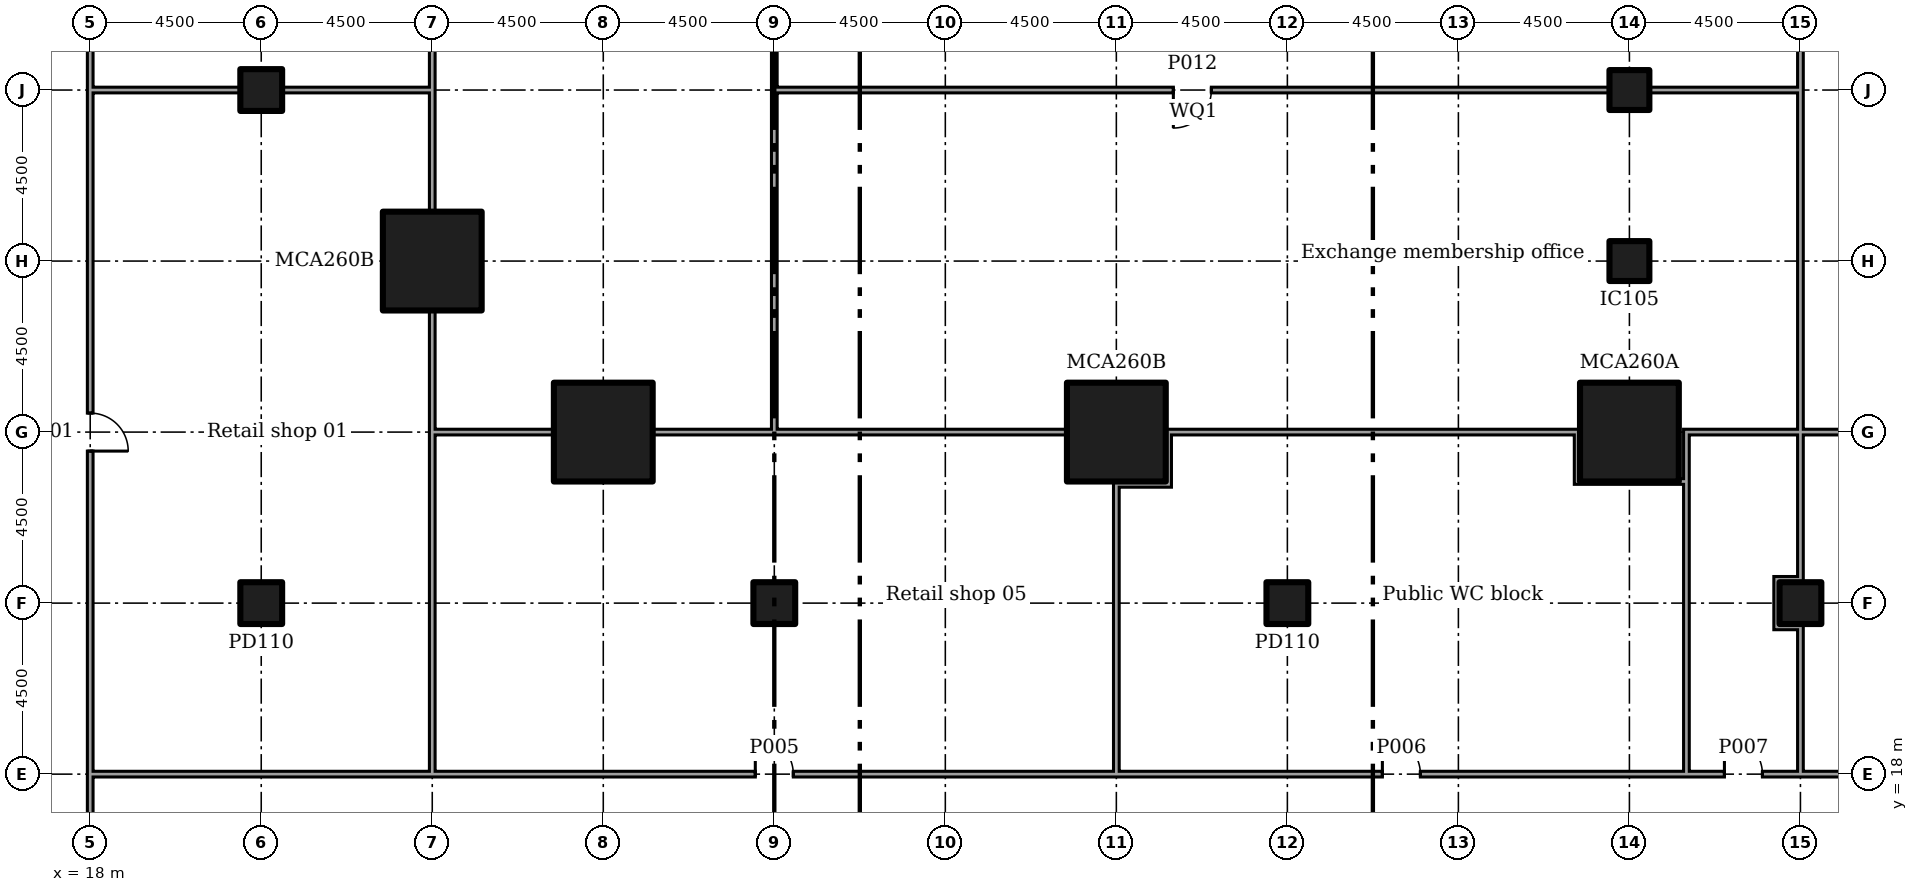
"""IFC4 building model, lengths in metres.
Left out: names, types, materials, properties, quantities, classifications, styles, units other than length and angle.
Written with IfcOpenShell. Run it as: python <this file> out.ifc"""

import sys

from ifc_helpers import new_model, si_unit, direction, frame, frame_2d, origin, origin_2d, place, context, subcontext, project, spatial, rectangle, extrude, element, fill, save


model = new_model("IFC4")
c1 = context("Model", 3, precision=1e-05, world=origin(), true_north=direction((0.0, 1.0)))
c2 = subcontext(c1, "Body", "Model", "MODEL_VIEW")
j1 = project(units=[si_unit("LENGTHUNIT", "METRE"), si_unit("PLANEANGLEUNIT", "RADIAN")], contexts=[c1])
p1 = place(None, origin())
s1 = spatial("IfcSite", under=j1, at=p1, CompositionType="ELEMENT")
p2 = place(p1, origin())
s2 = spatial("IfcBuilding", under=s1, at=p2, CompositionType="ELEMENT")
p3 = place(p2, frame((0.0, 0.0, 6.0)))
s3 = spatial("IfcBuildingStorey", under=s2, at=p3, CompositionType="ELEMENT", Elevation=6.0)
for number, where in (
    (1, (27.0, 31.5, 0.0)),
    (2, (31.5, 27.0, 0.0)),
    (3, (45.0, 27.0, 0.0)),
    (4, (58.5, 27.0, 0.0)),
):
    element("IfcColumn", number, at=place(p3, frame(where)), inside=s3, PredefinedType="COLUMN", context=c2, shape_type="SweptSolid", body=[
        extrude(rectangle(XDim=2.6, YDim=2.6, at=origin_2d()), origin(), (0.0, 0.0, 1.0), 5.5),
    ])
for number, where in (
    (5, (58.5, 31.5, 0.0)),
    (6, (58.5, 36.0, 0.0)),
):
    element("IfcColumn", number, at=place(p3, frame(where)), inside=s3, PredefinedType="COLUMN", context=c2, shape_type="SweptSolid", body=[
        extrude(rectangle(XDim=1.05, YDim=1.05, at=origin_2d()), origin(), (0.0, 0.0, 1.0), 5.5),
    ])
for number, where in (
    (7, (22.5, 22.5, 0.0)),
    (8, (22.5, 36.0, 0.0)),
    (9, (36.0, 22.5, 0.0)),
    (10, (49.5, 22.5, 0.0)),
    (11, (63.0, 22.5, 0.0)),
):
    element("IfcColumn", number, at=place(p3, frame(where)), inside=s3, PredefinedType="COLUMN", context=c2, shape_type="SweptSolid", body=[
        extrude(rectangle(XDim=1.1, YDim=1.1, at=origin_2d()), origin(), (0.0, 0.0, 1.0), 5.5),
    ])
p4 = place(p3, frame((18.0, 9.3, 0.0), z_axis=(0.0, 0.0, 1.0), x_axis=(0.0, 1.0, 0.0)))
e12 = element("IfcWall", 12, at=p4, inside=s3, PredefinedType="PARTITIONING", context=c2, shape_type="SweptSolid", body=[
    extrude(rectangle(XDim=8.775, YDim=0.15, at=frame_2d((4.387, 0.0))), origin(), (0.0, 0.0, 1.0), 5.05),
])
p5 = place(p4, frame((3.45, 0.0, 0.0)))
e13 = element("IfcOpeningElement", 13, at=p5, cuts=e12, PredefinedType="OPENING", context=c2, shape_type="SweptSolid", body=[
    extrude(rectangle(XDim=1.8, YDim=2.1, at=frame_2d((0.9, 1.05))), frame((0.0, 0.085, 0.0), z_axis=(0.0, -1.0, 0.0), x_axis=(1.0, 0.0, 0.0)), (0.0, 0.0, 1.0), 0.17),
])
p6 = place(p3, frame((18.0, 18.0, 0.0), z_axis=(0.0, 0.0, 1.0), x_axis=(0.0, 1.0, 0.0)))
e14 = element("IfcWall", 14, at=p6, inside=s3, PredefinedType="PARTITIONING", context=c2, shape_type="SweptSolid", body=[
    extrude(rectangle(XDim=18.075, YDim=0.15, at=frame_2d((9.038, 0.0))), origin(), (0.0, 0.0, 1.0), 5.05),
])
p7 = place(p6, frame((8.5, 0.0, 0.0)))
e15 = element("IfcOpeningElement", 15, at=p7, cuts=e14, PredefinedType="OPENING", context=c2, shape_type="SweptSolid", body=[
    extrude(rectangle(XDim=1.0, YDim=2.1, at=frame_2d((0.5, 1.05))), frame((0.0, 0.085, 0.0), z_axis=(0.0, -1.0, 0.0), x_axis=(1.0, 0.0, 0.0)), (0.0, 0.0, 1.0), 0.17),
])
p8 = place(p3, frame((18.0, 36.0, 0.0), z_axis=(0.0, 0.0, 1.0), x_axis=(0.0, 1.0, 0.0)))
e16 = element("IfcWall", 16, at=p8, inside=s3, PredefinedType="PARTITIONING", context=c2, shape_type="SweptSolid", body=[
    extrude(rectangle(XDim=18.075, YDim=0.15, at=frame_2d((9.038, 0.0))), origin(), (0.0, 0.0, 1.0), 5.05),
])
p9 = place(p8, frame((8.5, 0.0, 0.0)))
e17 = element("IfcOpeningElement", 17, at=p9, cuts=e16, PredefinedType="OPENING", context=c2, shape_type="SweptSolid", body=[
    extrude(rectangle(XDim=1.0, YDim=2.1, at=frame_2d((0.5, 1.05))), frame((0.0, 0.085, 0.0), z_axis=(0.0, -1.0, 0.0), x_axis=(1.0, 0.0, 0.0)), (0.0, 0.0, 1.0), 0.17),
])
p10 = place(p3, frame((18.075, 18.0, 0.0)))
e18 = element("IfcWall", 18, at=p10, inside=s3, PredefinedType="PARTITIONING", context=c2, shape_type="SweptSolid", body=[
    extrude(rectangle(XDim=9.0, YDim=0.15, at=frame_2d((4.5, 0.0))), origin(), (0.0, 0.0, 1.0), 5.05),
])
p11 = place(p3, frame((27.0, 18.0, 0.0)))
e19 = element("IfcWall", 19, at=p11, inside=s3, PredefinedType="PARTITIONING", context=c2, shape_type="SweptSolid", body=[
    extrude(rectangle(XDim=18.075, YDim=0.15, at=frame_2d((9.038, 0.0))), origin(), (0.0, 0.0, 1.0), 5.05),
])
p12 = place(p11, frame((8.5, 0.0, 0.0)))
e20 = element("IfcOpeningElement", 20, at=p12, cuts=e19, PredefinedType="OPENING", context=c2, shape_type="SweptSolid", body=[
    extrude(rectangle(XDim=1.0, YDim=2.1, at=frame_2d((0.5, 1.05))), frame((0.0, 0.085, 0.0), z_axis=(0.0, -1.0, 0.0), x_axis=(1.0, 0.0, 0.0)), (0.0, 0.0, 1.0), 0.17),
])
p13 = place(p3, frame((45.0, 18.0, 0.0)))
e21 = element("IfcWall", 21, at=p13, inside=s3, PredefinedType="PARTITIONING", context=c2, shape_type="SweptSolid", body=[
    extrude(rectangle(XDim=15.075, YDim=0.15, at=frame_2d((7.538, 0.0))), origin(), (0.0, 0.0, 1.0), 5.05),
])
p14 = place(p13, frame((7.0, 0.0, 0.0)))
e22 = element("IfcOpeningElement", 22, at=p14, cuts=e21, PredefinedType="OPENING", context=c2, shape_type="SweptSolid", body=[
    extrude(rectangle(XDim=1.0, YDim=2.1, at=frame_2d((0.5, 1.05))), frame((0.0, 0.085, 0.0), z_axis=(0.0, -1.0, 0.0), x_axis=(1.0, 0.0, 0.0)), (0.0, 0.0, 1.0), 0.17),
])
p15 = place(p3, frame((60.0, 18.0, 0.0)))
e23 = element("IfcWall", 23, at=p15, inside=s3, PredefinedType="PARTITIONING", context=c2, shape_type="SweptSolid", body=[
    extrude(rectangle(XDim=3.075, YDim=0.15, at=frame_2d((1.538, 0.0))), origin(), (0.0, 0.0, 1.0), 5.05),
])
p16 = place(p15, frame((1.0, 0.0, 0.0)))
e24 = element("IfcOpeningElement", 24, at=p16, cuts=e23, PredefinedType="OPENING", context=c2, shape_type="SweptSolid", body=[
    extrude(rectangle(XDim=1.0, YDim=2.1, at=frame_2d((0.5, 1.05))), frame((0.0, 0.085, 0.0), z_axis=(0.0, -1.0, 0.0), x_axis=(1.0, 0.0, 0.0)), (0.0, 0.0, 1.0), 0.17),
])
p17 = place(p3, frame((63.0, 18.0, 0.0)))
e25 = element("IfcWall", 25, at=p17, inside=s3, PredefinedType="PARTITIONING", context=c2, shape_type="SweptSolid", body=[
    extrude(rectangle(XDim=8.925, YDim=0.15, at=frame_2d((4.462, 0.0))), origin(), (0.0, 0.0, 1.0), 5.05),
])
p18 = place(p17, frame((4.0, 0.0, 0.0)))
e26 = element("IfcOpeningElement", 26, at=p18, cuts=e25, PredefinedType="OPENING", context=c2, shape_type="SweptSolid", body=[
    extrude(rectangle(XDim=1.0, YDim=2.1, at=frame_2d((0.5, 1.05))), frame((0.0, 0.085, 0.0), z_axis=(0.0, -1.0, 0.0), x_axis=(1.0, 0.0, 0.0)), (0.0, 0.0, 1.0), 0.17),
])
p19 = place(p3, frame((18.075, 36.0, 0.0)))
e27 = element("IfcWall", 27, at=p19, inside=s3, PredefinedType="PARTITIONING", context=c2, shape_type="SweptSolid", body=[
    extrude(rectangle(XDim=3.88, YDim=0.15, at=frame_2d((1.94, 0.0))), origin(), (0.0, 0.0, 1.0), 5.05),
])
p20 = place(p3, frame((23.045, 36.0, 0.0)))
e28 = element("IfcWall", 28, at=p20, inside=s3, PredefinedType="PARTITIONING", context=c2, shape_type="SweptSolid", body=[
    extrude(rectangle(XDim=4.03, YDim=0.15, at=frame_2d((2.015, 0.0))), origin(), (0.0, 0.0, 1.0), 5.05),
])
p21 = place(p3, frame((27.0, 18.075, 0.0), z_axis=(0.0, 0.0, 1.0), x_axis=(0.0, 1.0, 0.0)))
e29 = element("IfcWall", 29, at=p21, inside=s3, PredefinedType="PARTITIONING", context=c2, shape_type="SweptSolid", body=[
    extrude(rectangle(XDim=9.0, YDim=0.15, at=frame_2d((4.5, 0.0))), origin(), (0.0, 0.0, 1.0), 5.05),
])
p22 = place(p3, frame((27.0, 27.0, 0.0), z_axis=(0.0, 0.0, 1.0), x_axis=(0.0, 1.0, 0.0)))
e30 = element("IfcWall", 30, at=p22, inside=s3, PredefinedType="PARTITIONING", context=c2, shape_type="SweptSolid", body=[
    extrude(rectangle(XDim=3.205, YDim=0.15, at=frame_2d((1.603, 0.0))), origin(), (0.0, 0.0, 1.0), 5.05),
])
p23 = place(p3, frame((27.0, 32.795, 0.0), z_axis=(0.0, 0.0, 1.0), x_axis=(0.0, 1.0, 0.0)))
e31 = element("IfcWall", 31, at=p23, inside=s3, PredefinedType="PARTITIONING", context=c2, shape_type="SweptSolid", body=[
    extrude(rectangle(XDim=3.13, YDim=0.15, at=frame_2d((1.565, 0.0))), origin(), (0.0, 0.0, 1.0), 5.05),
])
p24 = place(p3, frame((27.0, 36.0, 0.0), z_axis=(0.0, 0.0, 1.0), x_axis=(0.0, 1.0, 0.0)))
e32 = element("IfcWall", 32, at=p24, inside=s3, PredefinedType="PARTITIONING", context=c2, shape_type="SweptSolid", body=[
    extrude(rectangle(XDim=7.705, YDim=0.15, at=frame_2d((3.853, 0.0))), origin(), (0.0, 0.0, 1.0), 5.05),
])
p25 = place(p3, frame((45.0, 18.075, 0.0), z_axis=(0.0, 0.0, 1.0), x_axis=(0.0, 1.0, 0.0)))
e33 = element("IfcWall", 33, at=p25, inside=s3, PredefinedType="PARTITIONING", context=c2, shape_type="SweptSolid", body=[
    extrude(rectangle(XDim=7.625, YDim=0.15, at=frame_2d((3.812, 0.0))), origin(), (0.0, 0.0, 1.0), 5.05),
])
p26 = place(p3, frame((27.075, 27.0, 0.0)))
e34 = element("IfcWall", 34, at=p26, inside=s3, PredefinedType="PARTITIONING", context=c2, shape_type="SweptSolid", body=[
    extrude(rectangle(XDim=3.13, YDim=0.15, at=frame_2d((1.565, 0.0))), origin(), (0.0, 0.0, 1.0), 5.05),
])
p27 = place(p3, frame((32.795, 27.0, 0.0)))
e35 = element("IfcWall", 35, at=p27, inside=s3, PredefinedType="PARTITIONING", context=c2, shape_type="SweptSolid", body=[
    extrude(rectangle(XDim=3.28, YDim=0.15, at=frame_2d((1.64, 0.0))), origin(), (0.0, 0.0, 1.0), 5.05),
])
p28 = place(p3, frame((36.0, 27.0, 0.0)))
e36 = element("IfcWall", 36, at=p28, inside=s3, PredefinedType="PARTITIONING", context=c2, shape_type="SweptSolid", body=[
    extrude(rectangle(XDim=7.705, YDim=0.15, at=frame_2d((3.853, 0.0))), origin(), (0.0, 0.0, 1.0), 5.05),
])
p29 = place(p3, frame((60.0, 18.075, 0.0), z_axis=(0.0, 0.0, 1.0), x_axis=(0.0, 1.0, 0.0)))
e37 = element("IfcWall", 37, at=p29, inside=s3, PredefinedType="PARTITIONING", context=c2, shape_type="SweptSolid", body=[
    extrude(rectangle(XDim=7.7, YDim=0.15, at=frame_2d((3.85, 0.0))), origin(), (0.0, 0.0, 1.0), 5.05),
])
p30 = place(p3, frame((46.375, 25.55, 0.0), z_axis=(0.0, 0.0, 1.0), x_axis=(0.0, 1.0, 0.0)))
e38 = element("IfcWall", 38, at=p30, inside=s3, PredefinedType="PARTITIONING", context=c2, shape_type="SweptSolid", body=[
    extrude(rectangle(XDim=1.525, YDim=0.15, at=frame_2d((0.762, 0.0))), origin(), (0.0, 0.0, 1.0), 5.05),
])
p31 = place(p3, frame((57.125, 25.625, 0.0), z_axis=(0.0, 0.0, 1.0), x_axis=(0.0, 1.0, 0.0)))
e39 = element("IfcWall", 39, at=p31, inside=s3, PredefinedType="PARTITIONING", context=c2, shape_type="SweptSolid", body=[
    extrude(rectangle(XDim=1.45, YDim=0.15, at=frame_2d((0.725, 0.0))), origin(), (0.0, 0.0, 1.0), 5.05),
])
p32 = place(p3, frame((45.075, 25.625, 0.0)))
e40 = element("IfcWall", 40, at=p32, inside=s3, PredefinedType="PARTITIONING", context=c2, shape_type="SweptSolid", body=[
    extrude(rectangle(XDim=1.225, YDim=0.15, at=frame_2d((0.613, 0.0))), origin(), (0.0, 0.0, 1.0), 5.05),
])
p33 = place(p3, frame((57.2, 25.7, 0.0)))
e41 = element("IfcWall", 41, at=p33, inside=s3, PredefinedType="PARTITIONING", context=c2, shape_type="SweptSolid", body=[
    extrude(rectangle(XDim=2.725, YDim=0.15, at=frame_2d((1.363, 0.0))), origin(), (0.0, 0.0, 1.0), 5.05),
])
p34 = place(p3, frame((46.45, 27.0, 0.0)))
e42 = element("IfcWall", 42, at=p34, inside=s3, PredefinedType="PARTITIONING", context=c2, shape_type="SweptSolid", body=[
    extrude(rectangle(XDim=10.6, YDim=0.15, at=frame_2d((5.3, 0.0))), origin(), (0.0, 0.0, 1.0), 5.05),
])
p35 = place(p3, frame((62.375, 21.8, 0.0), z_axis=(0.0, 0.0, 1.0), x_axis=(0.0, 1.0, 0.0)))
e43 = element("IfcWall", 43, at=p35, inside=s3, PredefinedType="PARTITIONING", context=c2, shape_type="SweptSolid", body=[
    extrude(rectangle(XDim=1.4, YDim=0.15, at=frame_2d((0.7, 0.0))), origin(), (0.0, 0.0, 1.0), 5.05),
])
p36 = place(p3, frame((63.0, 18.075, 0.0), z_axis=(0.0, 0.0, 1.0), x_axis=(0.0, 1.0, 0.0)))
e44 = element("IfcWall", 44, at=p36, inside=s3, PredefinedType="PARTITIONING", context=c2, shape_type="SweptSolid", body=[
    extrude(rectangle(XDim=3.875, YDim=0.15, at=frame_2d((1.938, 0.0))), origin(), (0.0, 0.0, 1.0), 5.05),
])
p37 = place(p3, frame((63.0, 23.05, 0.0), z_axis=(0.0, 0.0, 1.0), x_axis=(0.0, 1.0, 0.0)))
e45 = element("IfcWall", 45, at=p37, inside=s3, PredefinedType="PARTITIONING", context=c2, shape_type="SweptSolid", body=[
    extrude(rectangle(XDim=4.025, YDim=0.15, at=frame_2d((2.012, 0.0))), origin(), (0.0, 0.0, 1.0), 5.05),
])
for number, where in (
    (46, (62.45, 21.875, 0.0)),
    (47, (62.45, 23.125, 0.0)),
):
    element("IfcWall", number, at=place(p3, frame(where)), inside=s3, PredefinedType="PARTITIONING", context=c2, shape_type="SweptSolid", body=[
        extrude(rectangle(XDim=0.475, YDim=0.15, at=frame_2d((0.238, 0.0))), origin(), (0.0, 0.0, 1.0), 5.05),
    ])
p38 = place(p3, frame((60.0, 25.7, 0.0), z_axis=(0.0, 0.0, 1.0), x_axis=(0.0, 1.0, 0.0)))
e48 = element("IfcWall", 48, at=p38, inside=s3, PredefinedType="PARTITIONING", context=c2, shape_type="SweptSolid", body=[
    extrude(rectangle(XDim=1.375, YDim=0.15, at=frame_2d((0.688, 0.0))), origin(), (0.0, 0.0, 1.0), 5.05),
])
p39 = place(p3, frame((60.075, 27.0, 0.0)))
e49 = element("IfcWall", 49, at=p39, inside=s3, PredefinedType="PARTITIONING", context=c2, shape_type="SweptSolid", body=[
    extrude(rectangle(XDim=3.0, YDim=0.15, at=frame_2d((1.5, 0.0))), origin(), (0.0, 0.0, 1.0), 5.05),
])
p40 = place(p3, frame((63.075, 27.0, 0.0)))
e50 = element("IfcWall", 50, at=p40, inside=s3, PredefinedType="PARTITIONING", context=c2, shape_type="SweptSolid", body=[
    extrude(rectangle(XDim=3.13, YDim=0.15, at=frame_2d((1.565, 0.0))), origin(), (0.0, 0.0, 1.0), 5.05),
])
p41 = place(p3, frame((63.0, 27.075, 0.0), z_axis=(0.0, 0.0, 1.0), x_axis=(0.0, 1.0, 0.0)))
e51 = element("IfcWall", 51, at=p41, inside=s3, PredefinedType="PARTITIONING", context=c2, shape_type="SweptSolid", body=[
    extrude(rectangle(XDim=9.0, YDim=0.15, at=frame_2d((4.5, 0.0))), origin(), (0.0, 0.0, 1.0), 5.05),
])
p42 = place(p3, frame((63.0, 36.0, 0.0), z_axis=(0.0, 0.0, 1.0), x_axis=(0.0, 1.0, 0.0)))
e52 = element("IfcWall", 52, at=p42, inside=s3, PredefinedType="PARTITIONING", context=c2, shape_type="SweptSolid", body=[
    extrude(rectangle(XDim=21.98, YDim=0.15, at=frame_2d((10.99, 0.0))), origin(), (0.0, 0.0, 1.0), 5.05),
])
p43 = place(p42, frame((10.1, 0.0, 0.0)))
e53 = element("IfcOpeningElement", 53, at=p43, cuts=e52, PredefinedType="OPENING", context=c2, shape_type="SweptSolid", body=[
    extrude(rectangle(XDim=1.8, YDim=2.1, at=frame_2d((0.9, 1.05))), frame((0.0, 0.085, 0.0), z_axis=(0.0, -1.0, 0.0), x_axis=(1.0, 0.0, 0.0)), (0.0, 0.0, 1.0), 0.17),
])
p44 = place(p3, frame((36.0, 27.075, 0.0), z_axis=(0.0, 0.0, 1.0), x_axis=(0.0, 1.0, 0.0)))
e54 = element("IfcWall", 54, at=p44, inside=s3, PredefinedType="PARTITIONING", context=c2, shape_type="SweptSolid", body=[
    extrude(rectangle(XDim=9.0, YDim=0.15, at=frame_2d((4.5, 0.0))), origin(), (0.0, 0.0, 1.0), 5.05),
])
p45 = place(p3, frame((36.0, 36.0, 0.0), z_axis=(0.0, 0.0, 1.0), x_axis=(0.0, 1.0, 0.0)))
e55 = element("IfcWall", 55, at=p45, inside=s3, PredefinedType="PARTITIONING", context=c2, shape_type="SweptSolid", body=[
    extrude(rectangle(XDim=3.98, YDim=0.15, at=frame_2d((1.99, 0.0))), origin(), (0.0, 0.0, 1.0), 5.05),
])
p46 = place(p3, frame((36.075, 36.0, 0.0)))
e56 = element("IfcWall", 56, at=p46, inside=s3, PredefinedType="PARTITIONING", context=c2, shape_type="SweptSolid", body=[
    extrude(rectangle(XDim=21.905, YDim=0.15, at=frame_2d((10.953, 0.0))), origin(), (0.0, 0.0, 1.0), 5.05),
])
p47 = place(p46, frame((10.425, 0.0, 0.0)))
e57 = element("IfcOpeningElement", 57, at=p47, cuts=e56, PredefinedType="OPENING", context=c2, shape_type="SweptSolid", body=[
    extrude(rectangle(XDim=1.0, YDim=2.1, at=frame_2d((0.5, 1.05))), frame((0.0, 0.085, 0.0), z_axis=(0.0, -1.0, 0.0), x_axis=(1.0, 0.0, 0.0)), (0.0, 0.0, 1.0), 0.17),
])
p48 = place(p3, frame((59.02, 36.0, 0.0)))
e58 = element("IfcWall", 58, at=p48, inside=s3, PredefinedType="PARTITIONING", context=c2, shape_type="SweptSolid", body=[
    extrude(rectangle(XDim=3.905, YDim=0.15, at=frame_2d((1.953, 0.0))), origin(), (0.0, 0.0, 1.0), 5.05),
])
p49 = place(p7, frame((1.0, 0.0, 0.0), x_axis=(-1.0, 0.0, 0.0)))
e59 = element("IfcDoor", 59, at=p49, inside=s3, OperationType="SINGLE_SWING_LEFT", PredefinedType="DOOR", context=c2, shape_type="SweptSolid", body=[
    extrude(rectangle(XDim=1.0, YDim=2.1, at=frame_2d((0.5, 1.05))), frame((0.0, 0.025, 0.0), z_axis=(0.0, -1.0, 0.0), x_axis=(1.0, 0.0, 0.0)), (0.0, 0.0, 1.0), 0.05),
])
fill(e15, e59)
p50 = place(p12, origin())
e60 = element("IfcDoor", 60, at=p50, inside=s3, OperationType="SINGLE_SWING_RIGHT", PredefinedType="DOOR", context=c2, shape_type="SweptSolid", body=[
    extrude(rectangle(XDim=1.0, YDim=2.1, at=frame_2d((0.5, 1.05))), frame((0.0, 0.025, 0.0), z_axis=(0.0, -1.0, 0.0), x_axis=(1.0, 0.0, 0.0)), (0.0, 0.0, 1.0), 0.05),
])
fill(e20, e60)
p51 = place(p14, origin())
e61 = element("IfcDoor", 61, at=p51, inside=s3, OperationType="SINGLE_SWING_RIGHT", PredefinedType="DOOR", context=c2, shape_type="SweptSolid", body=[
    extrude(rectangle(XDim=1.0, YDim=2.1, at=frame_2d((0.5, 1.05))), frame((0.0, 0.025, 0.0), z_axis=(0.0, -1.0, 0.0), x_axis=(1.0, 0.0, 0.0)), (0.0, 0.0, 1.0), 0.05),
])
fill(e22, e61)
p52 = place(p16, origin())
e62 = element("IfcDoor", 62, at=p52, inside=s3, OperationType="SINGLE_SWING_RIGHT", PredefinedType="DOOR", context=c2, shape_type="SweptSolid", body=[
    extrude(rectangle(XDim=1.0, YDim=2.1, at=frame_2d((0.5, 1.05))), frame((0.0, 0.025, 0.0), z_axis=(0.0, -1.0, 0.0), x_axis=(1.0, 0.0, 0.0)), (0.0, 0.0, 1.0), 0.05),
])
fill(e24, e62)
p53 = place(p47, frame((1.0, 0.0, 0.0), x_axis=(-1.0, 0.0, 0.0)))
e63 = element("IfcDoor", 63, at=p53, inside=s3, OperationType="SINGLE_SWING_LEFT", PredefinedType="DOOR", context=c2, shape_type="SweptSolid", body=[
    extrude(rectangle(XDim=1.0, YDim=2.1, at=frame_2d((0.5, 1.05))), frame((0.0, 0.025, 0.0), z_axis=(0.0, -1.0, 0.0), x_axis=(1.0, 0.0, 0.0)), (0.0, 0.0, 1.0), 0.05),
])
fill(e57, e63)
save(model, sys.argv[1])
